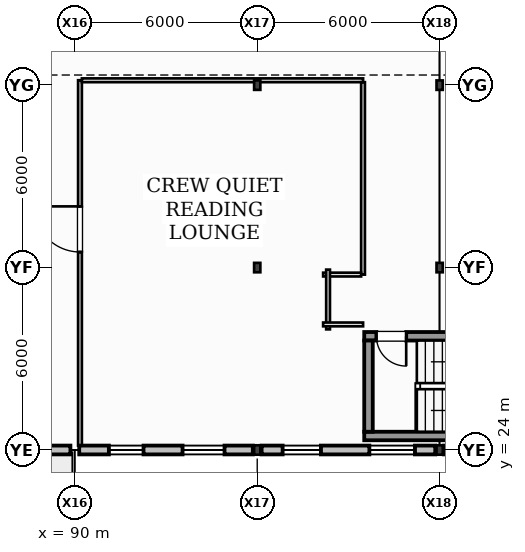
"""IFC4 building model, lengths in metres.
Left out: names, types, materials, properties, quantities, classifications, styles, units other than length and angle.
Written with IfcOpenShell. Run it as: python <this file> out.ifc"""

import sys

from ifc_helpers import new_model, si_unit, direction, frame, frame_2d, origin, origin_2d, place, context, subcontext, project, spatial, rectangle, i_section, extrude, element, fill, save


model = new_model("IFC4")
c1 = context("Model", 3, precision=1e-05, world=origin(), true_north=direction((0.0, 1.0)))
c2 = subcontext(c1, "Body", "Model", "MODEL_VIEW")
j1 = project(units=[si_unit("LENGTHUNIT", "METRE"), si_unit("PLANEANGLEUNIT", "RADIAN")], contexts=[c1])
p1 = place(None, origin())
s1 = spatial("IfcSite", under=j1, at=p1, CompositionType="ELEMENT")
p2 = place(p1, origin())
s2 = spatial("IfcBuilding", under=s1, at=p2, CompositionType="ELEMENT")
p3 = place(p2, frame((0.0, 0.0, 10.0)))
s3 = spatial("IfcBuildingStorey", under=s2, at=p3, CompositionType="ELEMENT", Elevation=10.0)
for number, where, z_axis, x_axis in (
    (1, (96.0, 24.0, 0.0), (0.0, 0.0, 1.0), (1.0, 0.0, 0.0)),
    (2, (96.0, 30.0, 0.0), (0.0, 0.0, 1.0), (1.0, 0.0, 0.0)),
    (3, (96.0, 36.0, 0.0), (0.0, 0.0, 1.0), (1.0, 0.0, 0.0)),
    (4, (102.0, 24.0, 0.0), (0.0, 0.0, 1.0), (1.0, 0.0, 0.0)),
    (5, (102.0, 30.0, 0.0), (0.0, 0.0, 1.0), (1.0, 0.0, 0.0)),
    (6, (102.0, 36.0, 0.0), (0.0, 0.0, 1.0), (1.0, 0.0, 0.0)),
):
    element("IfcColumn", number, at=place(p3, frame(where, z_axis=z_axis, x_axis=x_axis)), inside=s3, PredefinedType="COLUMN", context=c2, shape_type="SweptSolid", body=[
        extrude(i_section(OverallWidth=0.205, OverallDepth=0.31, WebThickness=0.01, FlangeThickness=0.016, at=origin_2d()), origin(), (0.0, 0.0, 1.0), 4.0),
    ])
p4 = place(p3, frame((84.145, 24.0, 0.0), z_axis=(0.0, 0.0, 1.0), x_axis=(1.0, 0.0, 0.0)))
e7 = element("IfcWall", 7, at=p4, inside=s3, PredefinedType="STANDARD", context=c2, shape_type="SweptSolid", body=[
    extrude(rectangle(XDim=5.71, YDim=0.29, at=frame_2d((2.855, 0.0))), origin(), (0.0, 0.0, 1.0), 3.619),
])
p5 = place(p4, frame((1.278, 0.0, 0.0)))
e8 = element("IfcOpeningElement", 8, at=p5, cuts=e7, PredefinedType="OPENING", context=c2, shape_type="SweptSolid", body=[
    extrude(rectangle(XDim=1.04, YDim=2.16, at=frame_2d((0.52, 1.08))), frame((0.0, 0.155, 0.0), z_axis=(0.0, -1.0, 0.0), x_axis=(1.0, 0.0, 0.0)), (0.0, 0.0, 1.0), 0.31),
])
p6 = place(p3, frame((90.145, 24.0, 0.0), z_axis=(0.0, 0.0, 1.0), x_axis=(1.0, 0.0, 0.0)))
e9 = element("IfcWall", 9, at=p6, inside=s3, PredefinedType="STANDARD", context=c2, shape_type="SweptSolid", body=[
    extrude(rectangle(XDim=5.71, YDim=0.29, at=frame_2d((2.855, 0.0))), origin(), (0.0, 0.0, 1.0), 4.0),
])
p7 = place(p6, frame((0.975, 0.0, 0.86)))
e10 = element("IfcOpeningElement", 10, at=p7, cuts=e9, PredefinedType="OPENING", context=c2, shape_type="SweptSolid", body=[
    extrude(rectangle(XDim=1.14, YDim=1.14, at=frame_2d((0.57, 0.57))), frame((0.0, 0.155, 0.0), z_axis=(0.0, -1.0, 0.0), x_axis=(1.0, 0.0, 0.0)), (0.0, 0.0, 1.0), 0.31),
])
p8 = place(p6, frame((3.399, 0.0, 1.42)))
e11 = element("IfcOpeningElement", 11, at=p8, cuts=e9, PredefinedType="OPENING", context=c2, shape_type="SweptSolid", body=[
    extrude(rectangle(XDim=1.38, YDim=1.38, at=frame_2d((0.69, 0.69))), frame((0.0, 0.155, 0.0), z_axis=(0.0, -1.0, 0.0), x_axis=(1.0, 0.0, 0.0)), (0.0, 0.0, 1.0), 0.31),
])
p9 = place(p3, frame((96.145, 24.0, 0.0), z_axis=(0.0, 0.0, 1.0), x_axis=(1.0, 0.0, 0.0)))
e12 = element("IfcWall", 12, at=p9, inside=s3, PredefinedType="STANDARD", context=c2, shape_type="SweptSolid", body=[
    extrude(rectangle(XDim=5.71, YDim=0.29, at=frame_2d((2.855, 0.0))), origin(), (0.0, 0.0, 1.0), 4.0),
])
p10 = place(p9, frame((0.691, 0.0, 1.18)))
e13 = element("IfcOpeningElement", 13, at=p10, cuts=e12, PredefinedType="OPENING", context=c2, shape_type="SweptSolid", body=[
    extrude(rectangle(XDim=1.26, YDim=1.26, at=frame_2d((0.63, 0.63))), frame((0.0, 0.155, 0.0), z_axis=(0.0, -1.0, 0.0), x_axis=(1.0, 0.0, 0.0)), (0.0, 0.0, 1.0), 0.31),
])
p11 = place(p9, frame((3.543, 0.0, 0.96)))
e14 = element("IfcOpeningElement", 14, at=p11, cuts=e12, PredefinedType="OPENING", context=c2, shape_type="SweptSolid", body=[
    extrude(rectangle(XDim=1.5, YDim=1.5, at=frame_2d((0.75, 0.75))), frame((0.0, 0.155, 0.0), z_axis=(0.0, -1.0, 0.0), x_axis=(1.0, 0.0, 0.0)), (0.0, 0.0, 1.0), 0.31),
])
p12 = place(p3, frame((102.145, 24.0, 0.0), z_axis=(0.0, 0.0, 1.0), x_axis=(1.0, 0.0, 0.0)))
e15 = element("IfcWall", 15, at=p12, inside=s3, PredefinedType="STANDARD", context=c2, shape_type="SweptSolid", body=[
    extrude(rectangle(XDim=5.71, YDim=0.29, at=frame_2d((2.855, 0.0))), origin(), (0.0, 0.0, 1.0), 4.0),
])
p13 = place(p12, frame((0.819, 0.0, 1.42)))
e16 = element("IfcOpeningElement", 16, at=p13, cuts=e15, PredefinedType="OPENING", context=c2, shape_type="SweptSolid", body=[
    extrude(rectangle(XDim=1.38, YDim=1.38, at=frame_2d((0.69, 0.69))), frame((0.0, 0.155, 0.0), z_axis=(0.0, -1.0, 0.0), x_axis=(1.0, 0.0, 0.0)), (0.0, 0.0, 1.0), 0.31),
])
p14 = place(p12, frame((3.567, 0.0, 1.28)))
e17 = element("IfcOpeningElement", 17, at=p14, cuts=e15, PredefinedType="OPENING", context=c2, shape_type="SweptSolid", body=[
    extrude(rectangle(XDim=0.9, YDim=0.9, at=frame_2d((0.45, 0.45))), frame((0.0, 0.155, 0.0), z_axis=(0.0, -1.0, 0.0), x_axis=(1.0, 0.0, 0.0)), (0.0, 0.0, 1.0), 0.31),
])
p15 = place(p3, frame((99.52, 24.46, 0.0), z_axis=(0.0, 0.0, 1.0), x_axis=(1.0, 0.0, 0.0)))
e18 = element("IfcWall", 18, at=p15, inside=s3, PredefinedType="SHEAR", context=c2, shape_type="SweptSolid", body=[
    extrude(rectangle(XDim=8.16, YDim=0.28, at=frame_2d((4.08, 0.0))), origin(), (0.0, 0.0, 1.0), 3.75),
])
p16 = place(p3, frame((107.68, 27.74, 0.0), z_axis=(0.0, 0.0, 1.0), x_axis=(-1.0, 0.0, 0.0)))
e19 = element("IfcWall", 19, at=p16, inside=s3, PredefinedType="SHEAR", context=c2, shape_type="SweptSolid", body=[
    extrude(rectangle(XDim=8.16, YDim=0.28, at=frame_2d((4.08, 0.0))), origin(), (0.0, 0.0, 1.0), 3.75),
])
p17 = place(p16, frame((6.78, 0.0, 0.0)))
e20 = element("IfcOpeningElement", 20, at=p17, cuts=e19, PredefinedType="OPENING", context=c2, shape_type="SweptSolid", body=[
    extrude(rectangle(XDim=0.98, YDim=2.15, at=frame_2d((0.49, 1.075))), frame((0.0, 0.15, 0.0), z_axis=(0.0, -1.0, 0.0), x_axis=(1.0, 0.0, 0.0)), (0.0, 0.0, 1.0), 0.3),
])
p18 = place(p3, frame((99.66, 27.6, 0.0), z_axis=(0.0, 0.0, 1.0), x_axis=(0.0, -1.0, 0.0)))
e21 = element("IfcWall", 21, at=p18, inside=s3, PredefinedType="SHEAR", context=c2, shape_type="SweptSolid", body=[
    extrude(rectangle(XDim=3.0, YDim=0.28, at=frame_2d((1.5, 0.0))), origin(), (0.0, 0.0, 1.0), 3.75),
])
p19 = place(p3, frame((90.17, 24.145, 0.0), z_axis=(0.0, 0.0, 1.0), x_axis=(0.0, 1.0, 0.0)))
e22 = element("IfcWall", 22, at=p19, inside=s3, PredefinedType="PARTITIONING", context=c2, shape_type="SweptSolid", body=[
    extrude(rectangle(XDim=12.018, YDim=0.125, at=frame_2d((6.009, 0.0))), origin(), (0.0, 0.0, 1.0), 3.74),
])
p20 = place(p19, frame((6.367, 0.0, 0.0)))
e23 = element("IfcOpeningElement", 23, at=p20, cuts=e22, PredefinedType="OPENING", context=c2, shape_type="SweptSolid", body=[
    extrude(rectangle(XDim=1.5, YDim=2.22, at=frame_2d((0.75, 1.11))), frame((0.0, 0.073, 0.0), z_axis=(0.0, -1.0, 0.0), x_axis=(1.0, 0.0, 0.0)), (0.0, 0.0, 1.0), 0.145),
])
p21 = place(p3, frame((90.232, 36.16, 0.0), z_axis=(0.0, 0.0, 1.0), x_axis=(1.0, 0.0, 0.0)))
e24 = element("IfcWall", 24, at=p21, inside=s3, PredefinedType="PARTITIONING", context=c2, shape_type="SweptSolid", body=[
    extrude(rectangle(XDim=9.25, YDim=0.125, at=frame_2d((4.625, 0.0))), origin(), (0.0, 0.0, 1.0), 3.74),
])
p22 = place(p3, frame((99.48, 36.097, 0.0), z_axis=(0.0, 0.0, 1.0), x_axis=(0.0, -1.0, 0.0)))
e25 = element("IfcWall", 25, at=p22, inside=s3, PredefinedType="PARTITIONING", context=c2, shape_type="SweptSolid", body=[
    extrude(rectangle(XDim=6.33, YDim=0.125, at=frame_2d((3.165, 0.0))), origin(), (0.0, 0.0, 1.0), 3.74),
])
p23 = place(p3, frame((99.417, 29.77, 0.0), z_axis=(0.0, 0.0, 1.0), x_axis=(-1.0, 0.0, 0.0)))
e26 = element("IfcWall", 26, at=p23, inside=s3, PredefinedType="PARTITIONING", context=c2, shape_type="SweptSolid", body=[
    extrude(rectangle(XDim=1.25, YDim=0.125, at=frame_2d((0.625, 0.0))), origin(), (0.0, 0.0, 1.0), 3.74),
])
p24 = place(p3, frame((98.33, 29.933, 0.0), z_axis=(0.0, 0.0, 1.0), x_axis=(0.0, -1.0, 0.0)))
e27 = element("IfcWall", 27, at=p24, inside=s3, PredefinedType="PARTITIONING", context=c2, shape_type="SweptSolid", body=[
    extrude(rectangle(XDim=1.965, YDim=0.125, at=frame_2d((0.982, 0.0))), origin(), (0.0, 0.0, 1.0), 3.74),
])
p25 = place(p3, frame((98.167, 28.13, 0.0), z_axis=(0.0, 0.0, 1.0), x_axis=(1.0, 0.0, 0.0)))
e28 = element("IfcWall", 28, at=p25, inside=s3, PredefinedType="PARTITIONING", context=c2, shape_type="SweptSolid", body=[
    extrude(rectangle(XDim=1.315, YDim=0.125, at=frame_2d((0.657, 0.0))), origin(), (0.0, 0.0, 1.0), 3.74),
])
p26 = place(p7, origin())
e29 = element("IfcWindow", 29, at=p26, inside=s3, PartitioningType="SINGLE_PANEL", PredefinedType="WINDOW", context=c2, shape_type="SweptSolid", body=[
    extrude(rectangle(XDim=1.14, YDim=1.14, at=frame_2d((0.57, 0.57))), frame((0.0, 0.03, 0.0), z_axis=(0.0, -1.0, 0.0), x_axis=(1.0, 0.0, 0.0)), (0.0, 0.0, 1.0), 0.06),
])
fill(e10, e29)
p27 = place(p8, origin())
e30 = element("IfcWindow", 30, at=p27, inside=s3, PartitioningType="SINGLE_PANEL", PredefinedType="WINDOW", context=c2, shape_type="SweptSolid", body=[
    extrude(rectangle(XDim=1.38, YDim=1.38, at=frame_2d((0.69, 0.69))), frame((0.0, 0.03, 0.0), z_axis=(0.0, -1.0, 0.0), x_axis=(1.0, 0.0, 0.0)), (0.0, 0.0, 1.0), 0.06),
])
fill(e11, e30)
p28 = place(p10, origin())
e31 = element("IfcWindow", 31, at=p28, inside=s3, PartitioningType="SINGLE_PANEL", PredefinedType="WINDOW", context=c2, shape_type="SweptSolid", body=[
    extrude(rectangle(XDim=1.26, YDim=1.26, at=frame_2d((0.63, 0.63))), frame((0.0, 0.03, 0.0), z_axis=(0.0, -1.0, 0.0), x_axis=(1.0, 0.0, 0.0)), (0.0, 0.0, 1.0), 0.06),
])
fill(e13, e31)
p29 = place(p11, origin())
e32 = element("IfcWindow", 32, at=p29, inside=s3, PartitioningType="SINGLE_PANEL", PredefinedType="WINDOW", context=c2, shape_type="SweptSolid", body=[
    extrude(rectangle(XDim=1.5, YDim=1.5, at=frame_2d((0.75, 0.75))), frame((0.0, 0.03, 0.0), z_axis=(0.0, -1.0, 0.0), x_axis=(1.0, 0.0, 0.0)), (0.0, 0.0, 1.0), 0.06),
])
fill(e14, e32)
p30 = place(p17, origin())
e33 = element("IfcDoor", 33, at=p30, inside=s3, OperationType="SINGLE_SWING_LEFT", PredefinedType="DOOR", context=c2, shape_type="SweptSolid", body=[
    extrude(rectangle(XDim=0.98, YDim=2.15, at=frame_2d((0.49, 1.075))), frame((0.0, 0.025, 0.0), z_axis=(0.0, -1.0, 0.0), x_axis=(1.0, 0.0, 0.0)), (0.0, 0.0, 1.0), 0.05),
])
fill(e20, e33)
p31 = place(p20, frame((1.5, 0.0, 0.0), z_axis=(0.0, 0.0, 1.0), x_axis=(-1.0, 0.0, 0.0)))
e34 = element("IfcDoor", 34, at=p31, inside=s3, OperationType="SINGLE_SWING_RIGHT", PredefinedType="DOOR", context=c2, shape_type="SweptSolid", body=[
    extrude(rectangle(XDim=1.5, YDim=2.22, at=frame_2d((0.75, 1.11))), frame((0.0, 0.025, 0.0), z_axis=(0.0, -1.0, 0.0), x_axis=(1.0, 0.0, 0.0)), (0.0, 0.0, 1.0), 0.05),
])
fill(e23, e34)
save(model, sys.argv[1])
